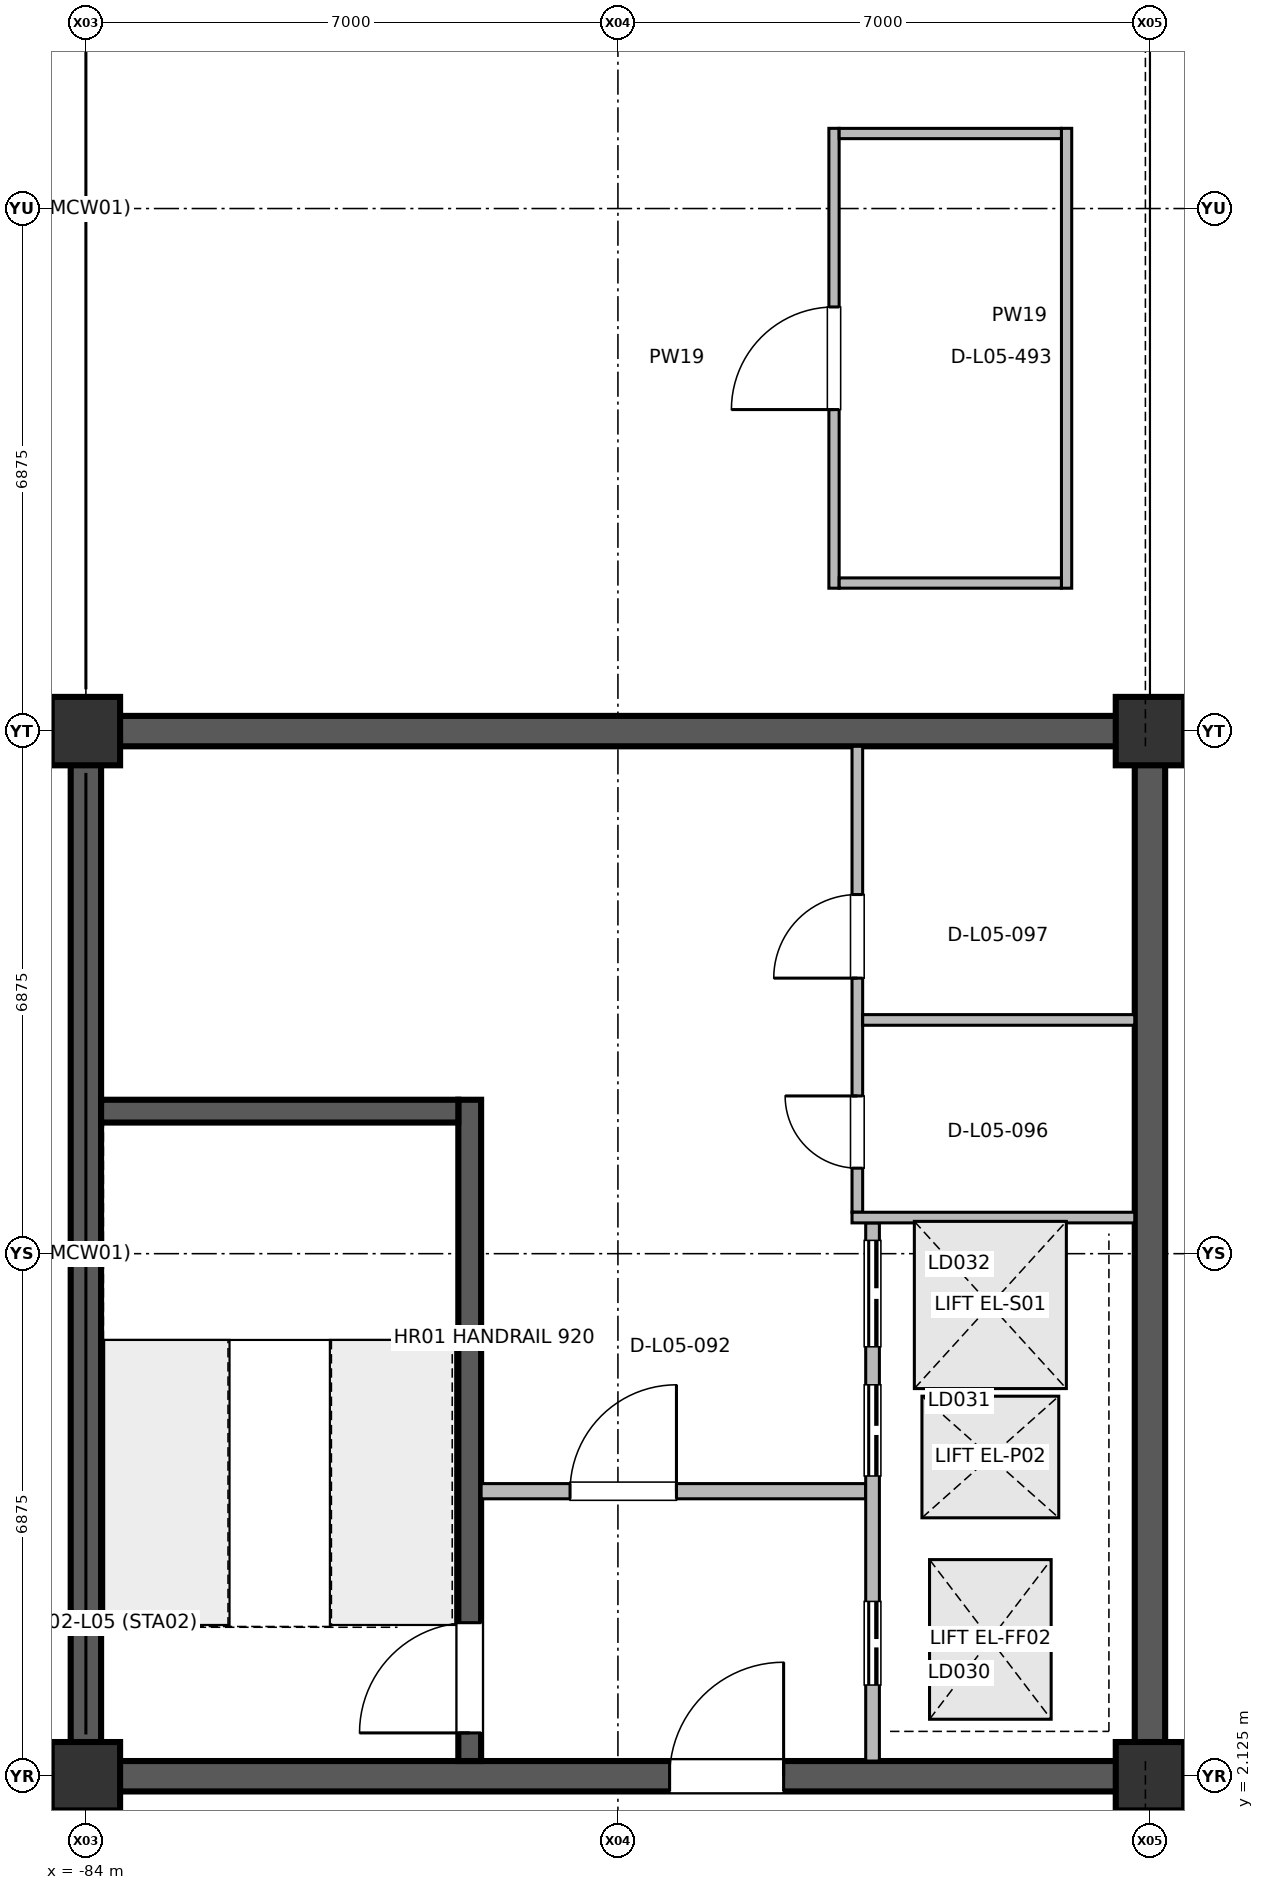
"""IFC4 building model, lengths in metres.
Left out: names, types, materials, properties, quantities, classifications, styles, units other than length and angle.
Written with IfcOpenShell. Run it as: python <this file> out.ifc"""

import sys

from ifc_helpers import new_model, si_unit, direction, frame, frame_2d, origin, origin_2d, place, context, subcontext, project, spatial, rectangle, extrude, element, fill, save


model = new_model("IFC4")
c1 = context("Model", 3, precision=1e-05, world=origin(), true_north=direction((0.0, 1.0)))
c2 = subcontext(c1, "Body", "Model", "MODEL_VIEW")
j1 = project(units=[si_unit("LENGTHUNIT", "METRE"), si_unit("PLANEANGLEUNIT", "RADIAN")], contexts=[c1])
p1 = place(None, origin())
s1 = spatial("IfcSite", under=j1, at=p1, CompositionType="ELEMENT")
p2 = place(p1, origin())
s2 = spatial("IfcBuilding", under=s1, at=p2, CompositionType="ELEMENT")
p3 = place(p2, frame((0.0, 0.0, 21.0)))
s3 = spatial("IfcBuildingStorey", under=s2, at=p3, CompositionType="ELEMENT", Elevation=21.0)
for number, where, z_axis, x_axis in (
    (1, (-84.0, 2.125, 0.0), (0.0, 0.0, 1.0), (1.0, 0.0, 0.0)),
    (2, (-84.0, 15.875, 0.0), (0.0, 0.0, 1.0), (1.0, 0.0, 0.0)),
    (3, (-70.0, 2.125, 0.0), (0.0, 0.0, 1.0), (1.0, 0.0, 0.0)),
    (4, (-70.0, 15.875, 0.0), (0.0, 0.0, 1.0), (1.0, 0.0, 0.0)),
):
    element("IfcColumn", number, at=place(p3, frame(where, z_axis=z_axis, x_axis=x_axis)), inside=s3, PredefinedType="COLUMN", context=c2, shape_type="SweptSolid", body=[
        extrude(rectangle(XDim=0.9, YDim=0.9, at=origin_2d()), origin(), (0.0, 0.0, 1.0), 5.398),
    ])
for number, where, z_axis, x_axis in (
    (5, (-84.0, 2.325, 0.0), (0.0, 0.0, 1.0), (0.0, 1.0, 0.0)),
    (6, (-70.0, 2.325, 0.0), (0.0, 0.0, 1.0), (0.0, 1.0, 0.0)),
):
    element("IfcWall", number, at=place(p3, frame(where, z_axis=z_axis, x_axis=x_axis)), inside=s3, PredefinedType="SHEAR", context=c2, shape_type="SweptSolid", body=[
        extrude(rectangle(XDim=13.35, YDim=0.4, at=frame_2d((6.675, 0.0))), origin(), (0.0, 0.0, 1.0), 5.22),
    ])
p4 = place(p3, frame((-83.8, 2.125, 0.0), z_axis=(0.0, 0.0, 1.0), x_axis=(1.0, 0.0, 0.0)))
e7 = element("IfcWall", 7, at=p4, inside=s3, PredefinedType="SHEAR", context=c2, shape_type="SweptSolid", body=[
    extrude(rectangle(XDim=13.6, YDim=0.4, at=frame_2d((6.8, 0.0))), origin(), (0.0, 0.0, 1.0), 5.22),
])
p5 = place(p4, frame((7.48, 0.0, 0.0)))
e8 = element("IfcOpeningElement", 8, at=p5, cuts=e7, PredefinedType="OPENING", context=c2, shape_type="SweptSolid", body=[
    extrude(rectangle(XDim=1.5, YDim=2.2, at=frame_2d((0.75, 1.1))), frame((0.0, 0.21, 0.0), z_axis=(0.0, -1.0, 0.0), x_axis=(1.0, 0.0, 0.0)), (0.0, 0.0, 1.0), 0.42),
])
p6 = place(p3, frame((-83.8, 15.875, 0.0), z_axis=(0.0, 0.0, 1.0), x_axis=(1.0, 0.0, 0.0)))
e9 = element("IfcWall", 9, at=p6, inside=s3, PredefinedType="SHEAR", context=c2, shape_type="SweptSolid", body=[
    extrude(rectangle(XDim=13.6, YDim=0.4, at=frame_2d((6.8, 0.0))), origin(), (0.0, 0.0, 1.0), 5.22),
])
p7 = place(p3, frame((-78.95, 2.325, 0.0), z_axis=(0.0, 0.0, 1.0), x_axis=(0.0, 1.0, 0.0)))
e10 = element("IfcWall", 10, at=p7, inside=s3, PredefinedType="SHEAR", context=c2, shape_type="SweptSolid", body=[
    extrude(rectangle(XDim=8.7, YDim=0.3, at=frame_2d((4.35, 0.0))), origin(), (0.0, 0.0, 1.0), 5.22),
])
p8 = place(p7, frame((0.37, 0.0, 0.0)))
e11 = element("IfcOpeningElement", 11, at=p8, cuts=e10, PredefinedType="OPENING", context=c2, shape_type="SweptSolid", body=[
    extrude(rectangle(XDim=1.45, YDim=2.2, at=frame_2d((0.725, 1.1))), frame((0.0, 0.16, 0.0), z_axis=(0.0, -1.0, 0.0), x_axis=(1.0, 0.0, 0.0)), (0.0, 0.0, 1.0), 0.32),
])
p9 = place(p3, frame((-78.8, 5.875, 0.0), z_axis=(0.0, 0.0, 1.0), x_axis=(1.0, 0.0, 0.0)))
e12 = element("IfcWall", 12, at=p9, inside=s3, PredefinedType="PARTITIONING", context=c2, shape_type="SweptSolid", body=[
    extrude(rectangle(XDim=5.06, YDim=0.2, at=frame_2d((2.53, 0.0))), origin(), (0.0, 0.0, 1.0), 4.42),
])
p10 = place(p9, frame((1.17, 0.0, 0.0)))
e13 = element("IfcOpeningElement", 13, at=p10, cuts=e12, PredefinedType="OPENING", context=c2, shape_type="SweptSolid", body=[
    extrude(rectangle(XDim=1.4, YDim=2.2, at=frame_2d((0.7, 1.1))), frame((0.0, 0.11, 0.0), z_axis=(0.0, -1.0, 0.0), x_axis=(1.0, 0.0, 0.0)), (0.0, 0.0, 1.0), 0.22),
])
p11 = place(p3, frame((-73.65, 2.325, 0.0), z_axis=(0.0, 0.0, 1.0), x_axis=(0.0, 1.0, 0.0)))
e14 = element("IfcWall", 14, at=p11, inside=s3, PredefinedType="PARTITIONING", context=c2, shape_type="SweptSolid", body=[
    extrude(rectangle(XDim=7.08, YDim=0.18, at=frame_2d((3.54, 0.0))), origin(), (0.0, 0.0, 1.0), 4.42),
])
p12 = place(p11, frame((1.0, 0.0, 0.0)))
e15 = element("IfcOpeningElement", 15, at=p12, cuts=e14, PredefinedType="OPENING", context=c2, shape_type="SweptSolid", body=[
    extrude(rectangle(XDim=1.1, YDim=2.2, at=frame_2d((0.55, 1.1))), frame((0.0, 0.1, 0.0), z_axis=(0.0, -1.0, 0.0), x_axis=(1.0, 0.0, 0.0)), (0.0, 0.0, 1.0), 0.2),
])
p13 = place(p11, frame((3.75, 0.0, 0.0)))
e16 = element("IfcOpeningElement", 16, at=p13, cuts=e14, PredefinedType="OPENING", context=c2, shape_type="SweptSolid", body=[
    extrude(rectangle(XDim=1.2, YDim=2.25, at=frame_2d((0.6, 1.125))), frame((0.0, 0.1, 0.0), z_axis=(0.0, -1.0, 0.0), x_axis=(1.0, 0.0, 0.0)), (0.0, 0.0, 1.0), 0.2),
])
p14 = place(p11, frame((5.45, 0.0, 0.0)))
e17 = element("IfcOpeningElement", 17, at=p14, cuts=e14, PredefinedType="OPENING", context=c2, shape_type="SweptSolid", body=[
    extrude(rectangle(XDim=1.4, YDim=2.3, at=frame_2d((0.7, 1.15))), frame((0.0, 0.1, 0.0), z_axis=(0.0, -1.0, 0.0), x_axis=(1.0, 0.0, 0.0)), (0.0, 0.0, 1.0), 0.2),
])
p15 = place(p3, frame((-73.85, 9.545, 0.0), z_axis=(0.0, 0.0, 1.0), x_axis=(0.0, 1.0, 0.0)))
e18 = element("IfcWall", 18, at=p15, inside=s3, PredefinedType="PARTITIONING", context=c2, shape_type="SweptSolid", body=[
    extrude(rectangle(XDim=6.13, YDim=0.14, at=frame_2d((3.065, 0.0))), origin(), (0.0, 0.0, 1.0), 4.42),
])
p16 = place(p15, frame((0.58, 0.0, 0.0)))
e19 = element("IfcOpeningElement", 19, at=p16, cuts=e18, PredefinedType="OPENING", context=c2, shape_type="SweptSolid", body=[
    extrude(rectangle(XDim=0.95, YDim=2.15, at=frame_2d((0.475, 1.075))), frame((0.0, 0.08, 0.0), z_axis=(0.0, -1.0, 0.0), x_axis=(1.0, 0.0, 0.0)), (0.0, 0.0, 1.0), 0.16),
])
p17 = place(p15, frame((3.08, 0.0, 0.0)))
e20 = element("IfcOpeningElement", 20, at=p17, cuts=e18, PredefinedType="OPENING", context=c2, shape_type="SweptSolid", body=[
    extrude(rectangle(XDim=1.1, YDim=2.15, at=frame_2d((0.55, 1.075))), frame((0.0, 0.08, 0.0), z_axis=(0.0, -1.0, 0.0), x_axis=(1.0, 0.0, 0.0)), (0.0, 0.0, 1.0), 0.16),
])
p18 = place(p3, frame((-74.157, 17.755, 0.0), z_axis=(0.0, 0.0, 1.0), x_axis=(0.0, 1.0, 0.0)))
e21 = element("IfcWall", 21, at=p18, inside=s3, PredefinedType="PARTITIONING", context=c2, shape_type="SweptSolid", body=[
    extrude(rectangle(XDim=6.05, YDim=0.135, at=frame_2d((3.025, 0.0))), origin(), (0.0, 0.0, 1.0), 4.42),
])
p19 = place(p18, frame((2.35, 0.0, 0.0)))
e22 = element("IfcOpeningElement", 22, at=p19, cuts=e21, PredefinedType="OPENING", context=c2, shape_type="SweptSolid", body=[
    extrude(rectangle(XDim=1.35, YDim=2.2, at=frame_2d((0.675, 1.1))), frame((0.0, 0.077, 0.0), z_axis=(0.0, -1.0, 0.0), x_axis=(1.0, 0.0, 0.0)), (0.0, 0.0, 1.0), 0.155),
])
p20 = place(p3, frame((-73.92, 9.475, 0.0), z_axis=(0.0, 0.0, 1.0), x_axis=(1.0, 0.0, 0.0)))
e23 = element("IfcWall", 23, at=p20, inside=s3, PredefinedType="PARTITIONING", context=c2, shape_type="SweptSolid", body=[
    extrude(rectangle(XDim=3.72, YDim=0.14, at=frame_2d((1.86, 0.0))), origin(), (0.0, 0.0, 1.0), 4.42),
])
p21 = place(p3, frame((-73.78, 12.075, 0.0), z_axis=(0.0, 0.0, 1.0), x_axis=(1.0, 0.0, 0.0)))
e24 = element("IfcWall", 24, at=p21, inside=s3, PredefinedType="PARTITIONING", context=c2, shape_type="SweptSolid", body=[
    extrude(rectangle(XDim=3.58, YDim=0.14, at=frame_2d((1.79, 0.0))), origin(), (0.0, 0.0, 1.0), 4.42),
])
p22 = place(p3, frame((-71.097, 17.755, 0.0), z_axis=(0.0, 0.0, 1.0), x_axis=(0.0, 1.0, 0.0)))
e25 = element("IfcWall", 25, at=p22, inside=s3, PredefinedType="PARTITIONING", context=c2, shape_type="SweptSolid", body=[
    extrude(rectangle(XDim=6.05, YDim=0.135, at=frame_2d((3.025, 0.0))), origin(), (0.0, 0.0, 1.0), 4.42),
])
for number, where, z_axis, x_axis in (
    (26, (-74.089, 17.823, 0.0), (0.0, 0.0, 1.0), (1.0, 0.0, 0.0)),
    (27, (-74.089, 23.737, 0.0), (0.0, 0.0, 1.0), (1.0, 0.0, 0.0)),
):
    element("IfcWall", number, at=place(p3, frame(where, z_axis=z_axis, x_axis=x_axis)), inside=s3, PredefinedType="PARTITIONING", context=c2, shape_type="SweptSolid", body=[
        extrude(rectangle(XDim=2.924, YDim=0.135, at=frame_2d((1.462, 0.0))), origin(), (0.0, 0.0, 1.0), 4.42),
    ])
p23 = place(p3, frame((-83.8, 10.875, 0.0), z_axis=(0.0, 0.0, 1.0), x_axis=(1.0, 0.0, 0.0)))
e28 = element("IfcWall", 28, at=p23, inside=s3, PredefinedType="SHEAR", context=c2, shape_type="SweptSolid", body=[
    extrude(rectangle(XDim=4.7, YDim=0.3, at=frame_2d((2.35, 0.0))), origin(), (0.0, 0.0, 1.0), 5.22),
])
p24 = place(p5, origin())
e29 = element("IfcDoor", 29, at=p24, inside=s3, OperationType="SINGLE_SWING_RIGHT", PredefinedType="DOOR", context=c2, shape_type="SweptSolid", body=[
    extrude(rectangle(XDim=1.5, YDim=2.2, at=frame_2d((0.75, 1.1))), frame((0.0, 0.025, 0.0), z_axis=(0.0, -1.0, 0.0), x_axis=(1.0, 0.0, 0.0)), (0.0, 0.0, 1.0), 0.05),
])
fill(e8, e29)
p25 = place(p8, origin())
e30 = element("IfcDoor", 30, at=p25, inside=s3, OperationType="SINGLE_SWING_LEFT", PredefinedType="DOOR", context=c2, shape_type="SweptSolid", body=[
    extrude(rectangle(XDim=1.45, YDim=2.2, at=frame_2d((0.725, 1.1))), frame((0.0, 0.025, 0.0), z_axis=(0.0, -1.0, 0.0), x_axis=(1.0, 0.0, 0.0)), (0.0, 0.0, 1.0), 0.05),
])
fill(e11, e30)
p26 = place(p10, origin())
e31 = element("IfcDoor", 31, at=p26, inside=s3, OperationType="SINGLE_SWING_RIGHT", PredefinedType="DOOR", context=c2, shape_type="SweptSolid", body=[
    extrude(rectangle(XDim=1.4, YDim=2.2, at=frame_2d((0.7, 1.1))), frame((0.0, 0.025, 0.0), z_axis=(0.0, -1.0, 0.0), x_axis=(1.0, 0.0, 0.0)), (0.0, 0.0, 1.0), 0.05),
])
fill(e13, e31)
p27 = place(p12, origin())
e32 = element("IfcDoor", 32, at=p27, inside=s3, OperationType="DOUBLE_DOOR_SLIDING", PredefinedType="DOOR", context=c2, shape_type="SweptSolid", body=[
    extrude(rectangle(XDim=1.1, YDim=2.2, at=frame_2d((0.55, 1.1))), frame((0.0, 0.025, 0.0), z_axis=(0.0, -1.0, 0.0), x_axis=(1.0, 0.0, 0.0)), (0.0, 0.0, 1.0), 0.05),
])
fill(e15, e32)
p28 = place(p13, origin())
e33 = element("IfcDoor", 33, at=p28, inside=s3, OperationType="DOUBLE_DOOR_SLIDING", PredefinedType="DOOR", context=c2, shape_type="SweptSolid", body=[
    extrude(rectangle(XDim=1.2, YDim=2.25, at=frame_2d((0.6, 1.125))), frame((0.0, 0.025, 0.0), z_axis=(0.0, -1.0, 0.0), x_axis=(1.0, 0.0, 0.0)), (0.0, 0.0, 1.0), 0.05),
])
fill(e16, e33)
p29 = place(p14, origin())
e34 = element("IfcDoor", 34, at=p29, inside=s3, OperationType="DOUBLE_DOOR_SLIDING", PredefinedType="DOOR", context=c2, shape_type="SweptSolid", body=[
    extrude(rectangle(XDim=1.4, YDim=2.3, at=frame_2d((0.7, 1.15))), frame((0.0, 0.025, 0.0), z_axis=(0.0, -1.0, 0.0), x_axis=(1.0, 0.0, 0.0)), (0.0, 0.0, 1.0), 0.05),
])
fill(e17, e34)
p30 = place(p16, origin())
e35 = element("IfcDoor", 35, at=p30, inside=s3, OperationType="SINGLE_SWING_RIGHT", PredefinedType="DOOR", context=c2, shape_type="SweptSolid", body=[
    extrude(rectangle(XDim=0.95, YDim=2.15, at=frame_2d((0.475, 1.075))), frame((0.0, 0.025, 0.0), z_axis=(0.0, -1.0, 0.0), x_axis=(1.0, 0.0, 0.0)), (0.0, 0.0, 1.0), 0.05),
])
fill(e19, e35)
p31 = place(p17, origin())
e36 = element("IfcDoor", 36, at=p31, inside=s3, OperationType="SINGLE_SWING_LEFT", PredefinedType="DOOR", context=c2, shape_type="SweptSolid", body=[
    extrude(rectangle(XDim=1.1, YDim=2.15, at=frame_2d((0.55, 1.075))), frame((0.0, 0.025, 0.0), z_axis=(0.0, -1.0, 0.0), x_axis=(1.0, 0.0, 0.0)), (0.0, 0.0, 1.0), 0.05),
])
fill(e20, e36)
p32 = place(p19, origin())
e37 = element("IfcDoor", 37, at=p32, inside=s3, OperationType="SINGLE_SWING_LEFT", PredefinedType="DOOR", context=c2, shape_type="SweptSolid", body=[
    extrude(rectangle(XDim=1.35, YDim=2.2, at=frame_2d((0.675, 1.1))), frame((0.0, 0.025, 0.0), z_axis=(0.0, -1.0, 0.0), x_axis=(1.0, 0.0, 0.0)), (0.0, 0.0, 1.0), 0.05),
])
fill(e22, e37)
save(model, sys.argv[1])
